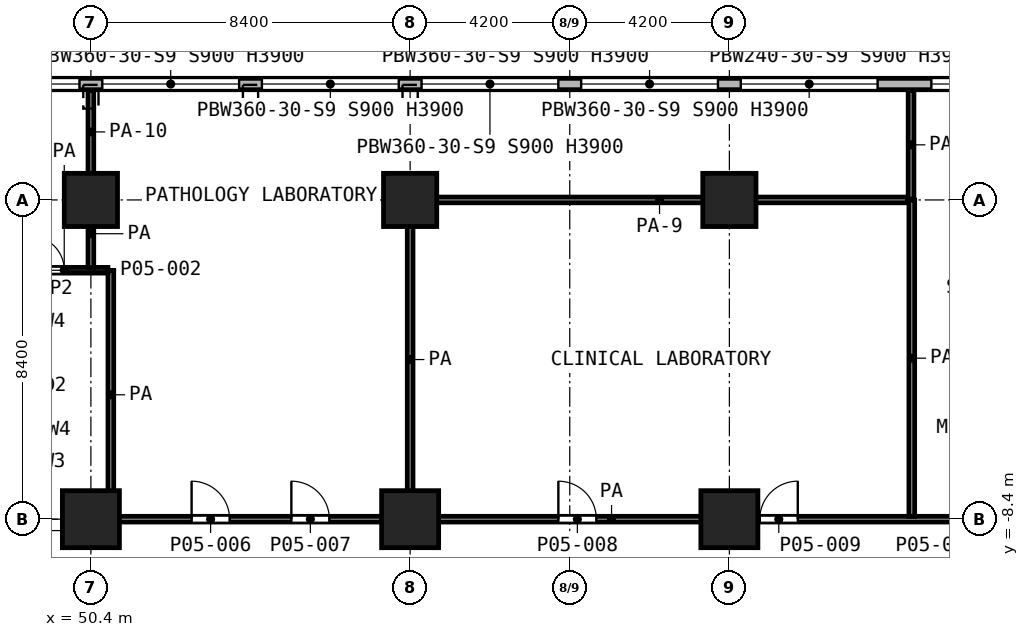
"""IFC4 building model, lengths in metres.
Left out: names, types, materials, properties, quantities, classifications, styles, units other than length and angle.
Written with IfcOpenShell. Run it as: python <this file> out.ifc"""

import sys

from ifc_helpers import new_model, si_unit, direction, frame, frame_2d, origin, origin_2d, place, context, subcontext, project, spatial, rectangle, extrude, element, fill, save


model = new_model("IFC4")
c1 = context("Model", 3, precision=1e-05, world=origin(), true_north=direction((0.0, 1.0)))
c2 = subcontext(c1, "Body", "Model", "MODEL_VIEW")
j1 = project(units=[si_unit("LENGTHUNIT", "METRE"), si_unit("PLANEANGLEUNIT", "RADIAN")], contexts=[c1])
p1 = place(None, origin())
s1 = spatial("IfcSite", under=j1, at=p1, CompositionType="ELEMENT")
p2 = place(p1, origin())
s2 = spatial("IfcBuilding", under=s1, at=p2, CompositionType="ELEMENT")
p3 = place(p2, frame((0.0, 0.0, 23.8)))
s3 = spatial("IfcBuildingStorey", under=s2, at=p3, CompositionType="ELEMENT", Elevation=23.8)
for number, where, z_axis, x_axis in (
    (1, (50.4, 0.0, 0.0), (0.0, 0.0, 1.0), (1.0, 0.0, 0.0)),
    (2, (58.8, 0.0, 0.0), (0.0, 0.0, 1.0), (1.0, 0.0, 0.0)),
    (3, (67.2, 0.0, 0.0), (0.0, 0.0, 1.0), (1.0, 0.0, 0.0)),
):
    element("IfcColumn", number, at=place(p3, frame(where, z_axis=z_axis, x_axis=x_axis)), inside=s3, PredefinedType="COLUMN", context=c2, shape_type="SweptSolid", body=[
        extrude(rectangle(XDim=1.4, YDim=1.4, at=origin_2d()), origin(), (0.0, 0.0, 1.0), 5.2),
    ])
for number, where, z_axis, x_axis in (
    (4, (50.4, -8.4, 0.0), (0.0, 0.0, 1.0), (1.0, 0.0, 0.0)),
    (5, (58.8, -8.4, 0.0), (0.0, 0.0, 1.0), (1.0, 0.0, 0.0)),
    (6, (67.2, -8.4, 0.0), (0.0, 0.0, 1.0), (1.0, 0.0, 0.0)),
):
    element("IfcColumn", number, at=place(p3, frame(where, z_axis=z_axis, x_axis=x_axis)), inside=s3, PredefinedType="COLUMN", context=c2, shape_type="SweptSolid", body=[
        extrude(rectangle(XDim=1.5, YDim=1.5, at=origin_2d()), origin(), (0.0, 0.0, 1.0), 5.2),
    ])
p4 = place(p3, frame((89.538, 3.05, 0.0), z_axis=(0.0, 0.0, 1.0), x_axis=(-1.0, 0.0, 0.0)))
e7 = element("IfcWall", 7, at=p4, inside=s3, PredefinedType="SOLIDWALL", context=c2, shape_type="SweptSolid", body=[
    extrude(rectangle(XDim=86.676, YDim=0.3, at=frame_2d((43.338, 0.0))), origin(), (0.0, 0.0, 1.0), 4.85),
])
p5 = place(p4, frame((1.638, 0.0, 0.9)))
e8 = element("IfcOpeningElement", 8, at=p5, cuts=e7, PredefinedType="OPENING", context=c2, shape_type="SweptSolid", body=[
    extrude(rectangle(XDim=3.6, YDim=3.0, at=frame_2d((1.8, 1.5))), frame((0.0, 0.16, 0.0), z_axis=(0.0, -1.0, 0.0), x_axis=(1.0, 0.0, 0.0)), (0.0, 0.0, 1.0), 0.32),
])
p6 = place(p4, frame((5.838, 0.0, 0.9)))
e9 = element("IfcOpeningElement", 9, at=p6, cuts=e7, PredefinedType="OPENING", context=c2, shape_type="SweptSolid", body=[
    extrude(rectangle(XDim=3.6, YDim=3.0, at=frame_2d((1.8, 1.5))), frame((0.0, 0.16, 0.0), z_axis=(0.0, -1.0, 0.0), x_axis=(1.0, 0.0, 0.0)), (0.0, 0.0, 1.0), 0.32),
])
p7 = place(p4, frame((10.723, 0.0, 0.9)))
e10 = element("IfcOpeningElement", 10, at=p7, cuts=e7, PredefinedType="OPENING", context=c2, shape_type="SweptSolid", body=[
    extrude(rectangle(XDim=2.4, YDim=3.0, at=frame_2d((1.2, 1.5))), frame((0.0, 0.16, 0.0), z_axis=(0.0, -1.0, 0.0), x_axis=(1.0, 0.0, 0.0)), (0.0, 0.0, 1.0), 0.32),
])
p8 = place(p4, frame((14.623, 0.0, 0.9)))
e11 = element("IfcOpeningElement", 11, at=p8, cuts=e7, PredefinedType="OPENING", context=c2, shape_type="SweptSolid", body=[
    extrude(rectangle(XDim=2.4, YDim=3.0, at=frame_2d((1.2, 1.5))), frame((0.0, 0.16, 0.0), z_axis=(0.0, -1.0, 0.0), x_axis=(1.0, 0.0, 0.0)), (0.0, 0.0, 1.0), 0.32),
])
p9 = place(p4, frame((18.438, 0.0, 0.9)))
e12 = element("IfcOpeningElement", 12, at=p9, cuts=e7, PredefinedType="OPENING", context=c2, shape_type="SweptSolid", body=[
    extrude(rectangle(XDim=3.6, YDim=3.0, at=frame_2d((1.8, 1.5))), frame((0.0, 0.16, 0.0), z_axis=(0.0, -1.0, 0.0), x_axis=(1.0, 0.0, 0.0)), (0.0, 0.0, 1.0), 0.32),
])
p10 = place(p4, frame((22.638, 0.0, 0.9)))
e13 = element("IfcOpeningElement", 13, at=p10, cuts=e7, PredefinedType="OPENING", context=c2, shape_type="SweptSolid", body=[
    extrude(rectangle(XDim=3.6, YDim=3.0, at=frame_2d((1.8, 1.5))), frame((0.0, 0.16, 0.0), z_axis=(0.0, -1.0, 0.0), x_axis=(1.0, 0.0, 0.0)), (0.0, 0.0, 1.0), 0.32),
])
p11 = place(p4, frame((26.838, 0.0, 0.9)))
e14 = element("IfcOpeningElement", 14, at=p11, cuts=e7, PredefinedType="OPENING", context=c2, shape_type="SweptSolid", body=[
    extrude(rectangle(XDim=3.6, YDim=3.0, at=frame_2d((1.8, 1.5))), frame((0.0, 0.16, 0.0), z_axis=(0.0, -1.0, 0.0), x_axis=(1.0, 0.0, 0.0)), (0.0, 0.0, 1.0), 0.32),
])
p12 = place(p4, frame((31.038, 0.0, 0.9)))
e15 = element("IfcOpeningElement", 15, at=p12, cuts=e7, PredefinedType="OPENING", context=c2, shape_type="SweptSolid", body=[
    extrude(rectangle(XDim=3.6, YDim=3.0, at=frame_2d((1.8, 1.5))), frame((0.0, 0.16, 0.0), z_axis=(0.0, -1.0, 0.0), x_axis=(1.0, 0.0, 0.0)), (0.0, 0.0, 1.0), 0.32),
])
p13 = place(p4, frame((35.238, 0.0, 0.9)))
e16 = element("IfcOpeningElement", 16, at=p13, cuts=e7, PredefinedType="OPENING", context=c2, shape_type="SweptSolid", body=[
    extrude(rectangle(XDim=3.6, YDim=3.0, at=frame_2d((1.8, 1.5))), frame((0.0, 0.16, 0.0), z_axis=(0.0, -1.0, 0.0), x_axis=(1.0, 0.0, 0.0)), (0.0, 0.0, 1.0), 0.32),
])
p14 = place(p4, frame((39.438, 0.0, 0.9)))
e17 = element("IfcOpeningElement", 17, at=p14, cuts=e7, PredefinedType="OPENING", context=c2, shape_type="SweptSolid", body=[
    extrude(rectangle(XDim=3.6, YDim=3.0, at=frame_2d((1.8, 1.5))), frame((0.0, 0.16, 0.0), z_axis=(0.0, -1.0, 0.0), x_axis=(1.0, 0.0, 0.0)), (0.0, 0.0, 1.0), 0.32),
])
p15 = place(p4, frame((43.638, 0.0, 0.9)))
e18 = element("IfcOpeningElement", 18, at=p15, cuts=e7, PredefinedType="OPENING", context=c2, shape_type="SweptSolid", body=[
    extrude(rectangle(XDim=3.6, YDim=3.0, at=frame_2d((1.8, 1.5))), frame((0.0, 0.16, 0.0), z_axis=(0.0, -1.0, 0.0), x_axis=(1.0, 0.0, 0.0)), (0.0, 0.0, 1.0), 0.32),
])
p16 = place(p4, frame((49.673, 0.0, 0.9)))
e19 = element("IfcOpeningElement", 19, at=p16, cuts=e7, PredefinedType="OPENING", context=c2, shape_type="SweptSolid", body=[
    extrude(rectangle(XDim=1.2, YDim=3.0, at=frame_2d((0.6, 1.5))), frame((0.0, 0.16, 0.0), z_axis=(0.0, -1.0, 0.0), x_axis=(1.0, 0.0, 0.0)), (0.0, 0.0, 1.0), 0.32),
])
p17 = place(p4, frame((52.038, 0.0, 0.9)))
e20 = element("IfcOpeningElement", 20, at=p17, cuts=e7, PredefinedType="OPENING", context=c2, shape_type="SweptSolid", body=[
    extrude(rectangle(XDim=3.6, YDim=3.0, at=frame_2d((1.8, 1.5))), frame((0.0, 0.16, 0.0), z_axis=(0.0, -1.0, 0.0), x_axis=(1.0, 0.0, 0.0)), (0.0, 0.0, 1.0), 0.32),
])
p18 = place(p4, frame((56.623, 0.0, 0.9)))
e21 = element("IfcOpeningElement", 21, at=p18, cuts=e7, PredefinedType="OPENING", context=c2, shape_type="SweptSolid", body=[
    extrude(rectangle(XDim=2.4, YDim=3.0, at=frame_2d((1.2, 1.5))), frame((0.0, 0.16, 0.0), z_axis=(0.0, -1.0, 0.0), x_axis=(1.0, 0.0, 0.0)), (0.0, 0.0, 1.0), 0.32),
])
p19 = place(p4, frame((60.438, 0.0, 0.9)))
e22 = element("IfcOpeningElement", 22, at=p19, cuts=e7, PredefinedType="OPENING", context=c2, shape_type="SweptSolid", body=[
    extrude(rectangle(XDim=3.6, YDim=3.0, at=frame_2d((1.8, 1.5))), frame((0.0, 0.16, 0.0), z_axis=(0.0, -1.0, 0.0), x_axis=(1.0, 0.0, 0.0)), (0.0, 0.0, 1.0), 0.32),
])
p20 = place(p4, frame((64.638, 0.0, 0.9)))
e23 = element("IfcOpeningElement", 23, at=p20, cuts=e7, PredefinedType="OPENING", context=c2, shape_type="SweptSolid", body=[
    extrude(rectangle(XDim=3.6, YDim=3.0, at=frame_2d((1.8, 1.5))), frame((0.0, 0.16, 0.0), z_axis=(0.0, -1.0, 0.0), x_axis=(1.0, 0.0, 0.0)), (0.0, 0.0, 1.0), 0.32),
])
p21 = place(p4, frame((68.838, 0.0, 0.9)))
e24 = element("IfcOpeningElement", 24, at=p21, cuts=e7, PredefinedType="OPENING", context=c2, shape_type="SweptSolid", body=[
    extrude(rectangle(XDim=3.6, YDim=3.0, at=frame_2d((1.8, 1.5))), frame((0.0, 0.16, 0.0), z_axis=(0.0, -1.0, 0.0), x_axis=(1.0, 0.0, 0.0)), (0.0, 0.0, 1.0), 0.32),
])
p22 = place(p4, frame((73.038, 0.0, 0.9)))
e25 = element("IfcOpeningElement", 25, at=p22, cuts=e7, PredefinedType="OPENING", context=c2, shape_type="SweptSolid", body=[
    extrude(rectangle(XDim=3.6, YDim=3.0, at=frame_2d((1.8, 1.5))), frame((0.0, 0.16, 0.0), z_axis=(0.0, -1.0, 0.0), x_axis=(1.0, 0.0, 0.0)), (0.0, 0.0, 1.0), 0.32),
])
p23 = place(p4, frame((77.238, 0.0, 0.9)))
e26 = element("IfcOpeningElement", 26, at=p23, cuts=e7, PredefinedType="OPENING", context=c2, shape_type="SweptSolid", body=[
    extrude(rectangle(XDim=3.6, YDim=3.0, at=frame_2d((1.8, 1.5))), frame((0.0, 0.16, 0.0), z_axis=(0.0, -1.0, 0.0), x_axis=(1.0, 0.0, 0.0)), (0.0, 0.0, 1.0), 0.32),
])
p24 = place(p4, frame((81.438, 0.0, 0.9)))
e27 = element("IfcOpeningElement", 27, at=p24, cuts=e7, PredefinedType="OPENING", context=c2, shape_type="SweptSolid", body=[
    extrude(rectangle(XDim=3.6, YDim=3.0, at=frame_2d((1.8, 1.5))), frame((0.0, 0.16, 0.0), z_axis=(0.0, -1.0, 0.0), x_axis=(1.0, 0.0, 0.0)), (0.0, 0.0, 1.0), 0.32),
])
p25 = place(p3, frame((51.0, -8.4, 0.0), z_axis=(0.0, 0.0, 1.0), x_axis=(1.0, 0.0, 0.0)))
e28 = element("IfcWall", 28, at=p25, inside=s3, PredefinedType="PARTITIONING", context=c2, shape_type="SweptSolid", body=[
    extrude(rectangle(XDim=26.2, YDim=0.15, at=frame_2d((13.1, 0.0))), origin(), (0.0, 0.0, 1.0), 4.85),
])
p26 = place(p25, frame((2.05, 0.0, 0.0)))
e29 = element("IfcOpeningElement", 29, at=p26, cuts=e28, PredefinedType="OPENING", context=c2, shape_type="SweptSolid", body=[
    extrude(rectangle(XDim=1.0, YDim=2.1, at=frame_2d((0.5, 1.05))), frame((0.0, 0.085, 0.0), z_axis=(0.0, -1.0, 0.0), x_axis=(1.0, 0.0, 0.0)), (0.0, 0.0, 1.0), 0.17),
])
p27 = place(p25, frame((4.675, 0.0, 0.0)))
e30 = element("IfcOpeningElement", 30, at=p27, cuts=e28, PredefinedType="OPENING", context=c2, shape_type="SweptSolid", body=[
    extrude(rectangle(XDim=1.0, YDim=2.1, at=frame_2d((0.5, 1.05))), frame((0.0, 0.085, 0.0), z_axis=(0.0, -1.0, 0.0), x_axis=(1.0, 0.0, 0.0)), (0.0, 0.0, 1.0), 0.17),
])
p28 = place(p25, frame((11.7, 0.0, 0.0)))
e31 = element("IfcOpeningElement", 31, at=p28, cuts=e28, PredefinedType="OPENING", context=c2, shape_type="SweptSolid", body=[
    extrude(rectangle(XDim=1.0, YDim=2.1, at=frame_2d((0.5, 1.05))), frame((0.0, 0.085, 0.0), z_axis=(0.0, -1.0, 0.0), x_axis=(1.0, 0.0, 0.0)), (0.0, 0.0, 1.0), 0.17),
])
p29 = place(p25, frame((17.0, 0.0, 0.0)))
e32 = element("IfcOpeningElement", 32, at=p29, cuts=e28, PredefinedType="OPENING", context=c2, shape_type="SweptSolid", body=[
    extrude(rectangle(XDim=1.0, YDim=2.1, at=frame_2d((0.5, 1.05))), frame((0.0, 0.085, 0.0), z_axis=(0.0, -1.0, 0.0), x_axis=(1.0, 0.0, 0.0)), (0.0, 0.0, 1.0), 0.17),
])
p30 = place(p25, frame((22.233, 0.0, 0.0)))
e33 = element("IfcOpeningElement", 33, at=p30, cuts=e28, PredefinedType="OPENING", context=c2, shape_type="SweptSolid", body=[
    extrude(rectangle(XDim=1.0, YDim=2.1, at=frame_2d((0.5, 1.05))), frame((0.0, 0.085, 0.0), z_axis=(0.0, -1.0, 0.0), x_axis=(1.0, 0.0, 0.0)), (0.0, 0.0, 1.0), 0.17),
])
p31 = place(p3, frame((48.55, -1.85, 0.0), z_axis=(0.0, 0.0, 1.0), x_axis=(1.0, 0.0, 0.0)))
e34 = element("IfcWall", 34, at=p31, inside=s3, PredefinedType="PARTITIONING", context=c2, shape_type="SweptSolid", body=[
    extrude(rectangle(XDim=2.297, YDim=0.15, at=frame_2d((1.148, 0.0))), origin(), (0.0, 0.0, 1.0), 4.85),
])
p32 = place(p31, frame((0.25, 0.0, 0.0)))
e35 = element("IfcOpeningElement", 35, at=p32, cuts=e34, PredefinedType="OPENING", context=c2, shape_type="SweptSolid", body=[
    extrude(rectangle(XDim=0.9, YDim=2.1, at=frame_2d((0.45, 1.05))), frame((0.0, 0.085, 0.0), z_axis=(0.0, -1.0, 0.0), x_axis=(1.0, 0.0, 0.0)), (0.0, 0.0, 1.0), 0.17),
])
p33 = place(p3, frame((58.84, 0.0, 0.0), z_axis=(0.0, 0.0, 1.0), x_axis=(1.0, 0.0, 0.0)))
e36 = element("IfcWall", 36, at=p33, inside=s3, PredefinedType="PARTITIONING", context=c2, shape_type="SweptSolid", body=[
    extrude(rectangle(XDim=13.045, YDim=0.15, at=frame_2d((6.522, 0.0))), origin(), (0.0, 0.0, 1.0), 3.45),
])
p34 = place(p3, frame((50.4, -1.775, 0.0), z_axis=(0.0, 0.0, 1.0), x_axis=(0.0, 1.0, 0.0)))
e37 = element("IfcWall", 37, at=p34, inside=s3, PredefinedType="PARTITIONING", context=c2, shape_type="SweptSolid", body=[
    extrude(rectangle(XDim=1.772, YDim=0.15, at=frame_2d((0.886, 0.0))), origin(), (0.0, 0.0, 1.0), 4.85),
])
p35 = place(p3, frame((50.4, 0.7, 0.0), z_axis=(0.0, 0.0, 1.0), x_axis=(0.0, 1.0, 0.0)))
e38 = element("IfcWall", 38, at=p35, inside=s3, PredefinedType="PARTITIONING", context=c2, shape_type="SweptSolid", body=[
    extrude(rectangle(XDim=2.18, YDim=0.15, at=frame_2d((1.09, 0.0))), origin(), (0.0, 0.0, 1.0), 3.95),
])
p36 = place(p3, frame((50.925, -8.4, 0.0), z_axis=(0.0, 0.0, 1.0), x_axis=(0.0, 1.0, 0.0)))
e39 = element("IfcWall", 39, at=p36, inside=s3, PredefinedType="PARTITIONING", context=c2, shape_type="SweptSolid", body=[
    extrude(rectangle(XDim=6.547, YDim=0.15, at=frame_2d((3.273, 0.0))), origin(), (0.0, 0.0, 1.0), 4.85),
])
p37 = place(p3, frame((58.8, -8.325, 0.0), z_axis=(0.0, 0.0, 1.0), x_axis=(0.0, 1.0, 0.0)))
e40 = element("IfcWall", 40, at=p37, inside=s3, PredefinedType="PARTITIONING", context=c2, shape_type="SweptSolid", body=[
    extrude(rectangle(XDim=8.25, YDim=0.15, at=frame_2d((4.125, 0.0))), origin(), (0.0, 0.0, 1.0), 4.85),
])
p38 = place(p3, frame((71.98, 0.02, 0.0), z_axis=(0.0, 0.0, 1.0), x_axis=(0.0, 1.0, 0.0)))
e41 = element("IfcWall", 41, at=p38, inside=s3, PredefinedType="PARTITIONING", context=c2, shape_type="SweptSolid", body=[
    extrude(rectangle(XDim=2.86, YDim=0.15, at=frame_2d((1.43, 0.0))), origin(), (0.0, 0.0, 1.0), 3.45),
])
p39 = place(p3, frame((72.0, -8.325, 0.0), z_axis=(0.0, 0.0, 1.0), x_axis=(0.0, 1.0, 0.0)))
e42 = element("IfcWall", 42, at=p39, inside=s3, PredefinedType="PARTITIONING", context=c2, shape_type="SweptSolid", body=[
    extrude(rectangle(XDim=8.323, YDim=0.15, at=frame_2d((4.162, 0.0))), origin(), (0.0, 0.0, 1.0), 3.45),
])
p40 = place(p8, origin())
e43 = element("IfcWindow", 43, at=p40, inside=s3, PartitioningType="SINGLE_PANEL", PredefinedType="WINDOW", context=c2, shape_type="SweptSolid", body=[
    extrude(rectangle(XDim=2.4, YDim=3.0, at=frame_2d((1.2, 1.5))), frame((0.0, 0.03, 0.0), z_axis=(0.0, -1.0, 0.0), x_axis=(1.0, 0.0, 0.0)), (0.0, 0.0, 1.0), 0.06),
])
fill(e11, e43)
p41 = place(p9, origin())
e44 = element("IfcWindow", 44, at=p41, inside=s3, PartitioningType="SINGLE_PANEL", PredefinedType="WINDOW", context=c2, shape_type="SweptSolid", body=[
    extrude(rectangle(XDim=3.6, YDim=3.0, at=frame_2d((1.8, 1.5))), frame((0.0, 0.03, 0.0), z_axis=(0.0, -1.0, 0.0), x_axis=(1.0, 0.0, 0.0)), (0.0, 0.0, 1.0), 0.06),
])
fill(e12, e44)
p42 = place(p10, origin())
e45 = element("IfcWindow", 45, at=p42, inside=s3, PartitioningType="SINGLE_PANEL", PredefinedType="WINDOW", context=c2, shape_type="SweptSolid", body=[
    extrude(rectangle(XDim=3.6, YDim=3.0, at=frame_2d((1.8, 1.5))), frame((0.0, 0.03, 0.0), z_axis=(0.0, -1.0, 0.0), x_axis=(1.0, 0.0, 0.0)), (0.0, 0.0, 1.0), 0.06),
])
fill(e13, e45)
p43 = place(p11, origin())
e46 = element("IfcWindow", 46, at=p43, inside=s3, PartitioningType="SINGLE_PANEL", PredefinedType="WINDOW", context=c2, shape_type="SweptSolid", body=[
    extrude(rectangle(XDim=3.6, YDim=3.0, at=frame_2d((1.8, 1.5))), frame((0.0, 0.03, 0.0), z_axis=(0.0, -1.0, 0.0), x_axis=(1.0, 0.0, 0.0)), (0.0, 0.0, 1.0), 0.06),
])
fill(e14, e46)
p44 = place(p12, origin())
e47 = element("IfcWindow", 47, at=p44, inside=s3, PartitioningType="SINGLE_PANEL", PredefinedType="WINDOW", context=c2, shape_type="SweptSolid", body=[
    extrude(rectangle(XDim=3.6, YDim=3.0, at=frame_2d((1.8, 1.5))), frame((0.0, 0.03, 0.0), z_axis=(0.0, -1.0, 0.0), x_axis=(1.0, 0.0, 0.0)), (0.0, 0.0, 1.0), 0.06),
])
fill(e15, e47)
p45 = place(p13, origin())
e48 = element("IfcWindow", 48, at=p45, inside=s3, PartitioningType="SINGLE_PANEL", PredefinedType="WINDOW", context=c2, shape_type="SweptSolid", body=[
    extrude(rectangle(XDim=3.6, YDim=3.0, at=frame_2d((1.8, 1.5))), frame((0.0, 0.03, 0.0), z_axis=(0.0, -1.0, 0.0), x_axis=(1.0, 0.0, 0.0)), (0.0, 0.0, 1.0), 0.06),
])
fill(e16, e48)
p46 = place(p14, origin())
e49 = element("IfcWindow", 49, at=p46, inside=s3, PartitioningType="SINGLE_PANEL", PredefinedType="WINDOW", context=c2, shape_type="SweptSolid", body=[
    extrude(rectangle(XDim=3.6, YDim=3.0, at=frame_2d((1.8, 1.5))), frame((0.0, 0.03, 0.0), z_axis=(0.0, -1.0, 0.0), x_axis=(1.0, 0.0, 0.0)), (0.0, 0.0, 1.0), 0.06),
])
fill(e17, e49)
p47 = place(p32, origin())
e50 = element("IfcDoor", 50, at=p47, inside=s3, OperationType="SINGLE_SWING_LEFT", PredefinedType="DOOR", context=c2, shape_type="SweptSolid", body=[
    extrude(rectangle(XDim=0.9, YDim=2.1, at=frame_2d((0.45, 1.05))), frame((0.0, 0.025, 0.0), z_axis=(0.0, -1.0, 0.0), x_axis=(1.0, 0.0, 0.0)), (0.0, 0.0, 1.0), 0.05),
])
fill(e35, e50)
p48 = place(p26, origin())
e51 = element("IfcDoor", 51, at=p48, inside=s3, OperationType="SINGLE_SWING_LEFT", PredefinedType="DOOR", context=c2, shape_type="SweptSolid", body=[
    extrude(rectangle(XDim=1.0, YDim=2.1, at=frame_2d((0.5, 1.05))), frame((0.0, 0.025, 0.0), z_axis=(0.0, -1.0, 0.0), x_axis=(1.0, 0.0, 0.0)), (0.0, 0.0, 1.0), 0.05),
])
fill(e29, e51)
p49 = place(p27, origin())
e52 = element("IfcDoor", 52, at=p49, inside=s3, OperationType="SINGLE_SWING_LEFT", PredefinedType="DOOR", context=c2, shape_type="SweptSolid", body=[
    extrude(rectangle(XDim=1.0, YDim=2.1, at=frame_2d((0.5, 1.05))), frame((0.0, 0.025, 0.0), z_axis=(0.0, -1.0, 0.0), x_axis=(1.0, 0.0, 0.0)), (0.0, 0.0, 1.0), 0.05),
])
fill(e30, e52)
p50 = place(p28, origin())
e53 = element("IfcDoor", 53, at=p50, inside=s3, OperationType="SINGLE_SWING_LEFT", PredefinedType="DOOR", context=c2, shape_type="SweptSolid", body=[
    extrude(rectangle(XDim=1.0, YDim=2.1, at=frame_2d((0.5, 1.05))), frame((0.0, 0.025, 0.0), z_axis=(0.0, -1.0, 0.0), x_axis=(1.0, 0.0, 0.0)), (0.0, 0.0, 1.0), 0.05),
])
fill(e31, e53)
p51 = place(p29, origin())
e54 = element("IfcDoor", 54, at=p51, inside=s3, OperationType="SINGLE_SWING_RIGHT", PredefinedType="DOOR", context=c2, shape_type="SweptSolid", body=[
    extrude(rectangle(XDim=1.0, YDim=2.1, at=frame_2d((0.5, 1.05))), frame((0.0, 0.025, 0.0), z_axis=(0.0, -1.0, 0.0), x_axis=(1.0, 0.0, 0.0)), (0.0, 0.0, 1.0), 0.05),
])
fill(e32, e54)
save(model, sys.argv[1])
